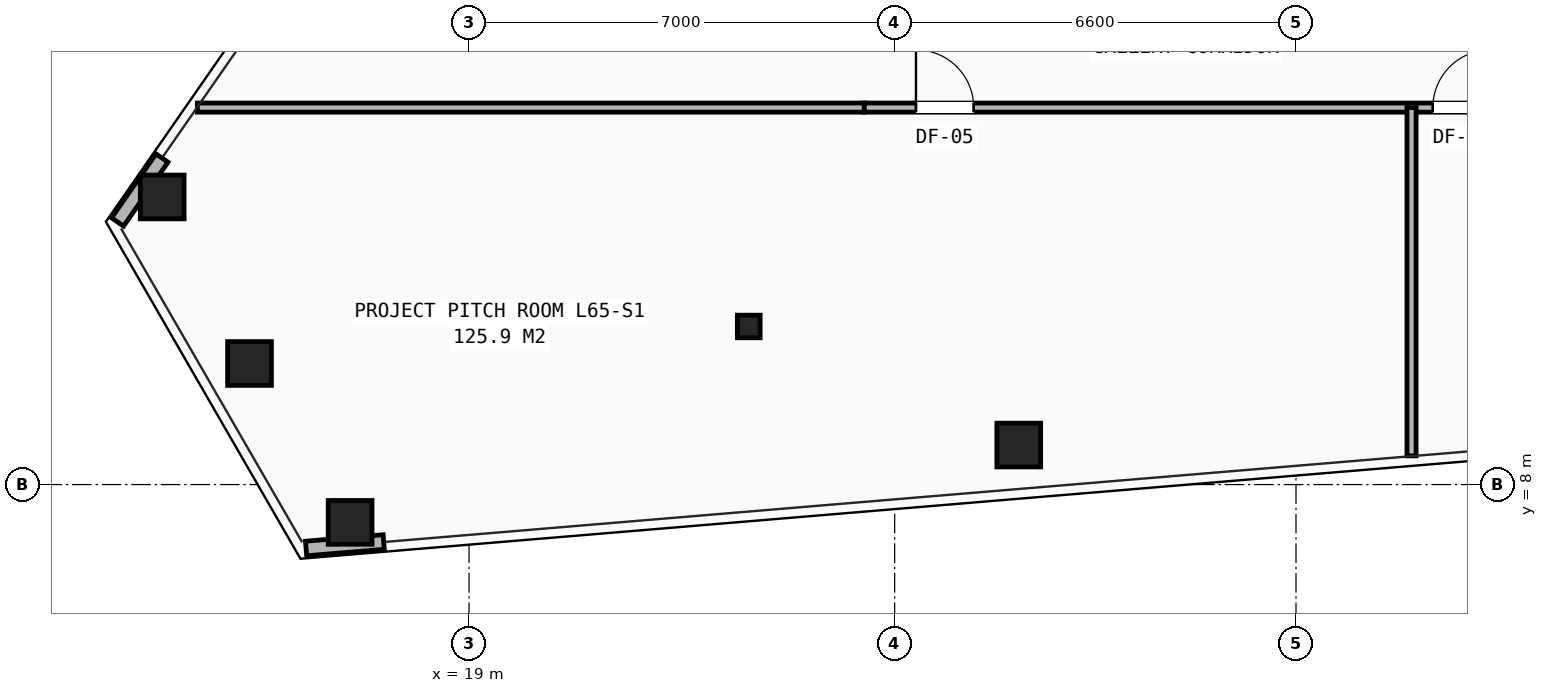
"""IFC4 building model, lengths in metres.
Left out: names, types, materials, properties, quantities, classifications, styles, units other than length and angle.
Written with IfcOpenShell. Run it as: python <this file> out.ifc"""

import sys

from ifc_helpers import new_model, si_unit, direction, frame, frame_2d, origin, origin_2d, place, context, subcontext, project, spatial, rectangle, hollow_rectangle, i_section, extrude, element, fill, save


model = new_model("IFC4")
c1 = context("Model", 3, precision=1e-05, world=origin(), true_north=direction((0.0, 1.0)))
c2 = subcontext(c1, "Body", "Model", "MODEL_VIEW")
j1 = project(units=[si_unit("LENGTHUNIT", "METRE"), si_unit("PLANEANGLEUNIT", "RADIAN")], contexts=[c1])
p1 = place(None, origin())
s1 = spatial("IfcSite", under=j1, at=p1, CompositionType="ELEMENT")
p2 = place(p1, origin())
s2 = spatial("IfcBuilding", under=s1, at=p2, CompositionType="ELEMENT")
p3 = place(p2, frame((0.0, 0.0, 229.4)))
s3 = spatial("IfcBuildingStorey", under=s2, at=p3, CompositionType="ELEMENT", Elevation=229.4)
p4 = place(p3, frame((23.6, 10.6, 0.0), z_axis=(0.0, 0.0, 1.0), x_axis=(1.0, 0.0, 0.0)))
e1 = element("IfcColumn", 1, at=p4, inside=s3, PredefinedType="COLUMN", context=c2, shape_type="SweptSolid", body=[
    extrude(i_section(OverallWidth=0.374, OverallDepth=0.372, WebThickness=0.016, FlangeThickness=0.026, at=origin_2d()), origin(), (0.0, 0.0, 1.0), 3.5),
])
for number, where, z_axis, x_axis in (
    (2, (13.954, 12.73, 0.0), (0.0, 0.0, 1.0), (1.0, 0.0, 0.0)),
    (3, (15.39, 9.991, 0.0), (0.0, 0.0, 1.0), (1.0, 0.0, 0.0)),
    (4, (17.044, 7.378, 0.0), (0.0, 0.0, 1.0), (1.0, 0.0, 0.0)),
    (5, (28.041, 8.65, 0.0), (0.0, 0.0, 1.0), (1.0, 0.0, 0.0)),
):
    element("IfcColumn", number, at=place(p3, frame(where, z_axis=z_axis, x_axis=x_axis)), inside=s3, PredefinedType="COLUMN", context=c2, shape_type="SweptSolid", body=[
        extrude(hollow_rectangle(XDim=0.72, YDim=0.72, WallThickness=0.05, at=origin_2d()), origin(), (0.0, 0.0, 1.0), 3.5),
    ])
p5 = place(p3, frame((13.95, 13.371, 0.0), z_axis=(0.0, 0.0, 1.0), x_axis=(-0.5703386897, -0.821409629254, 0.0)))
e6 = element("IfcWall", 6, at=p5, inside=s3, PredefinedType="SHEAR", context=c2, shape_type="SweptSolid", body=[
    extrude(rectangle(XDim=1.282, YDim=0.24, at=frame_2d((0.641, 0.0))), origin(), (0.0, 0.0, 1.0), 2.623),
])
p6 = place(p3, frame((16.32, 6.948, 0.0), z_axis=(0.0, 0.0, 1.0), x_axis=(0.996527336769, 0.083266242097, 0.0)))
e7 = element("IfcWall", 7, at=p6, inside=s3, PredefinedType="SHEAR", context=c2, shape_type="SweptSolid", body=[
    extrude(rectangle(XDim=1.281, YDim=0.24, at=frame_2d((0.641, 0.0))), origin(), (0.0, 0.0, 1.0), 2.623),
])
p7 = place(p3, frame((14.532, 14.2, 0.0), z_axis=(0.0, 0.0, 1.0), x_axis=(1.0, 0.0, 0.0)))
e8 = element("IfcWall", 8, at=p7, inside=s3, PredefinedType="PARTITIONING", context=c2, shape_type="SweptSolid", body=[
    extrude(rectangle(XDim=10.968, YDim=0.15, at=frame_2d((5.484, 0.0))), origin(), (0.0, 0.0, 1.0), 2.292),
])
p8 = place(p3, frame((25.5, 14.2, 0.0), z_axis=(0.0, 0.0, 1.0), x_axis=(1.0, 0.0, 0.0)))
e9 = element("IfcWall", 9, at=p8, inside=s3, PredefinedType="PARTITIONING", context=c2, shape_type="SweptSolid", body=[
    extrude(rectangle(XDim=29.0, YDim=0.15, at=frame_2d((14.5, 0.0))), origin(), (0.0, 0.0, 1.0), 2.292),
])
p9 = place(p8, frame((0.85, 0.0, 0.0)))
e10 = element("IfcOpeningElement", 10, at=p9, cuts=e9, PredefinedType="OPENING", context=c2, shape_type="SweptSolid", body=[
    extrude(rectangle(XDim=0.95, YDim=2.1, at=frame_2d((0.475, 1.05))), frame((0.0, 0.085, 0.0), z_axis=(0.0, -1.0, 0.0), x_axis=(1.0, 0.0, 0.0)), (0.0, 0.0, 1.0), 0.17),
])
p10 = place(p8, frame((9.35, 0.0, 0.0)))
e11 = element("IfcOpeningElement", 11, at=p10, cuts=e9, PredefinedType="OPENING", context=c2, shape_type="SweptSolid", body=[
    extrude(rectangle(XDim=0.95, YDim=2.1, at=frame_2d((0.475, 1.05))), frame((0.0, 0.085, 0.0), z_axis=(0.0, -1.0, 0.0), x_axis=(1.0, 0.0, 0.0)), (0.0, 0.0, 1.0), 0.17),
])
p11 = place(p8, frame((16.05, 0.0, 0.0)))
e12 = element("IfcOpeningElement", 12, at=p11, cuts=e9, PredefinedType="OPENING", context=c2, shape_type="SweptSolid", body=[
    extrude(rectangle(XDim=0.95, YDim=2.1, at=frame_2d((0.475, 1.05))), frame((0.0, 0.085, 0.0), z_axis=(0.0, -1.0, 0.0), x_axis=(1.0, 0.0, 0.0)), (0.0, 0.0, 1.0), 0.17),
])
p12 = place(p3, frame((34.5, 8.472, 0.0), z_axis=(0.0, 0.0, 1.0), x_axis=(0.0, 1.0, 0.0)))
e13 = element("IfcWall", 13, at=p12, inside=s3, PredefinedType="PARTITIONING", context=c2, shape_type="SweptSolid", body=[
    extrude(rectangle(XDim=5.728, YDim=0.15, at=frame_2d((2.864, 0.0))), origin(), (0.0, 0.0, 1.0), 2.292),
])
p13 = place(p9, origin())
e14 = element("IfcDoor", 14, at=p13, inside=s3, OperationType="SINGLE_SWING_LEFT", PredefinedType="DOOR", context=c2, shape_type="SweptSolid", body=[
    extrude(rectangle(XDim=0.95, YDim=2.1, at=frame_2d((0.475, 1.05))), frame((0.0, 0.025, 0.0), z_axis=(0.0, -1.0, 0.0), x_axis=(1.0, 0.0, 0.0)), (0.0, 0.0, 1.0), 0.05),
])
fill(e10, e14)
p14 = place(p10, origin())
e15 = element("IfcDoor", 15, at=p14, inside=s3, OperationType="SINGLE_SWING_RIGHT", PredefinedType="DOOR", context=c2, shape_type="SweptSolid", body=[
    extrude(rectangle(XDim=0.95, YDim=2.1, at=frame_2d((0.475, 1.05))), frame((0.0, 0.025, 0.0), z_axis=(0.0, -1.0, 0.0), x_axis=(1.0, 0.0, 0.0)), (0.0, 0.0, 1.0), 0.05),
])
fill(e11, e15)
save(model, sys.argv[1])
